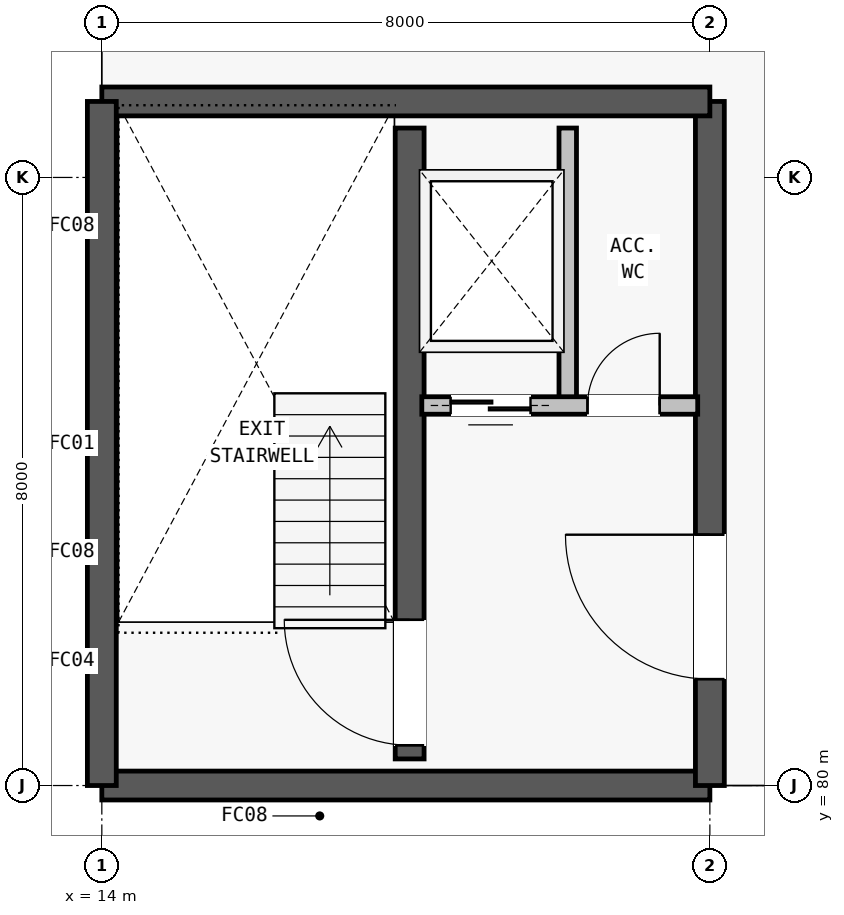
"""IFC4 building model, lengths in metres.
Left out: names, types, materials, properties, quantities, classifications, styles, units other than length and angle.
Written with IfcOpenShell. Run it as: python <this file> out.ifc"""

import sys

from ifc_helpers import new_model, si_unit, direction, frame, frame_2d, origin, place, context, subcontext, project, spatial, rectangle, extrude, element, fill, save


model = new_model("IFC4")
c1 = context("Model", 3, precision=1e-05, world=origin(), true_north=direction((0.0, 1.0)))
c2 = subcontext(c1, "Body", "Model", "MODEL_VIEW")
j1 = project(units=[si_unit("LENGTHUNIT", "METRE"), si_unit("PLANEANGLEUNIT", "RADIAN")], contexts=[c1])
p1 = place(None, origin())
s1 = spatial("IfcSite", under=j1, at=p1, CompositionType="ELEMENT")
p2 = place(p1, origin())
s2 = spatial("IfcBuilding", under=s1, at=p2, CompositionType="ELEMENT")
p3 = place(p2, frame((0.0, 0.0, 13.4)))
s3 = spatial("IfcBuildingStorey", under=s2, at=p3, CompositionType="ELEMENT", Elevation=13.4)
p4 = place(p3, frame((14.0, 80.0, 0.0), z_axis=(0.0, 0.0, 1.0), x_axis=(1.0, 0.0, 0.0)))
e1 = element("IfcWall", 1, at=p4, inside=s3, PredefinedType="SHEAR", context=c2, shape_type="SweptSolid", body=[
    extrude(rectangle(XDim=8.0, YDim=0.38, at=frame_2d((4.0, 0.0))), origin(), (0.0, 0.0, 1.0), 3.645),
])
p5 = place(p3, frame((22.0, 80.0, 0.0), z_axis=(0.0, 0.0, 1.0), x_axis=(0.0, 1.0, 0.0)))
e2 = element("IfcWall", 2, at=p5, inside=s3, PredefinedType="SHEAR", context=c2, shape_type="SweptSolid", body=[
    extrude(rectangle(XDim=9.0, YDim=0.38, at=frame_2d((4.5, 0.0))), origin(), (0.0, 0.0, 1.0), 3.645),
])
p6 = place(p5, frame((1.4, 0.0, 0.0)))
e3 = element("IfcOpeningElement", 3, at=p6, cuts=e2, PredefinedType="OPENING", context=c2, shape_type="SweptSolid", body=[
    extrude(rectangle(XDim=1.9, YDim=2.3, at=frame_2d((0.95, 1.15))), frame((0.0, 0.2, 0.0), z_axis=(0.0, -1.0, 0.0), x_axis=(1.0, 0.0, 0.0)), (0.0, 0.0, 1.0), 0.4),
])
p7 = place(p3, frame((22.0, 89.0, 0.0), z_axis=(0.0, 0.0, 1.0), x_axis=(-1.0, 0.0, 0.0)))
e4 = element("IfcWall", 4, at=p7, inside=s3, PredefinedType="SHEAR", context=c2, shape_type="SweptSolid", body=[
    extrude(rectangle(XDim=8.0, YDim=0.38, at=frame_2d((4.0, 0.0))), origin(), (0.0, 0.0, 1.0), 3.645),
])
p8 = place(p3, frame((14.0, 89.0, 0.0), z_axis=(0.0, 0.0, 1.0), x_axis=(0.0, -1.0, 0.0)))
e5 = element("IfcWall", 5, at=p8, inside=s3, PredefinedType="SHEAR", context=c2, shape_type="SweptSolid", body=[
    extrude(rectangle(XDim=9.0, YDim=0.38, at=frame_2d((4.5, 0.0))), origin(), (0.0, 0.0, 1.0), 3.645),
])
p9 = place(p3, frame((18.05, 80.35, 0.0), z_axis=(0.0, 0.0, 1.0), x_axis=(0.0, 1.0, 0.0)))
e6 = element("IfcWall", 6, at=p9, inside=s3, PredefinedType="SHEAR", context=c2, shape_type="SweptSolid", body=[
    extrude(rectangle(XDim=8.3, YDim=0.38, at=frame_2d((4.15, 0.0))), origin(), (0.0, 0.0, 1.0), 3.645),
])
p10 = place(p9, frame((0.18, 0.0, 0.0)))
e7 = element("IfcOpeningElement", 7, at=p10, cuts=e6, PredefinedType="OPENING", context=c2, shape_type="SweptSolid", body=[
    extrude(rectangle(XDim=1.65, YDim=2.2, at=frame_2d((0.825, 1.1))), frame((0.0, 0.2, 0.0), z_axis=(0.0, -1.0, 0.0), x_axis=(1.0, 0.0, 0.0)), (0.0, 0.0, 1.0), 0.4),
])
p11 = place(p3, frame((20.13, 85.0, 0.0), z_axis=(0.0, 0.0, 1.0), x_axis=(0.0, 1.0, 0.0)))
e8 = element("IfcWall", 8, at=p11, inside=s3, PredefinedType="PARTITIONING", context=c2, shape_type="SweptSolid", body=[
    extrude(rectangle(XDim=3.65, YDim=0.23, at=frame_2d((1.825, 0.0))), origin(), (0.0, 0.0, 1.0), 2.48),
])
p12 = place(p3, frame((18.21, 85.0, 0.0), z_axis=(0.0, 0.0, 1.0), x_axis=(1.0, 0.0, 0.0)))
e9 = element("IfcWall", 9, at=p12, inside=s3, PredefinedType="PARTITIONING", context=c2, shape_type="SweptSolid", body=[
    extrude(rectangle(XDim=3.63, YDim=0.23, at=frame_2d((1.815, 0.0))), origin(), (0.0, 0.0, 1.0), 2.48),
])
p13 = place(p12, frame((0.38, 0.0, 0.0)))
e10 = element("IfcOpeningElement", 10, at=p13, cuts=e9, PredefinedType="OPENING", context=c2, shape_type="SweptSolid", body=[
    extrude(rectangle(XDim=1.05, YDim=2.15, at=frame_2d((0.525, 1.075))), frame((0.0, 0.125, 0.0), z_axis=(0.0, -1.0, 0.0), x_axis=(1.0, 0.0, 0.0)), (0.0, 0.0, 1.0), 0.25),
])
p14 = place(p12, frame((2.18, 0.0, 0.0)))
e11 = element("IfcOpeningElement", 11, at=p14, cuts=e9, PredefinedType="OPENING", context=c2, shape_type="SweptSolid", body=[
    extrude(rectangle(XDim=0.95, YDim=2.1, at=frame_2d((0.475, 1.05))), frame((0.0, 0.125, 0.0), z_axis=(0.0, -1.0, 0.0), x_axis=(1.0, 0.0, 0.0)), (0.0, 0.0, 1.0), 0.25),
])
p15 = place(p6, origin())
e12 = element("IfcDoor", 12, at=p15, inside=s3, OperationType="SINGLE_SWING_RIGHT", PredefinedType="DOOR", context=c2, shape_type="SweptSolid", body=[
    extrude(rectangle(XDim=1.9, YDim=2.3, at=frame_2d((0.95, 1.15))), frame((0.0, 0.025, 0.0), z_axis=(0.0, -1.0, 0.0), x_axis=(1.0, 0.0, 0.0)), (0.0, 0.0, 1.0), 0.05),
])
fill(e3, e12)
p16 = place(p10, origin())
e13 = element("IfcDoor", 13, at=p16, inside=s3, OperationType="SINGLE_SWING_RIGHT", PredefinedType="DOOR", context=c2, shape_type="SweptSolid", body=[
    extrude(rectangle(XDim=1.65, YDim=2.2, at=frame_2d((0.825, 1.1))), frame((0.0, 0.025, 0.0), z_axis=(0.0, -1.0, 0.0), x_axis=(1.0, 0.0, 0.0)), (0.0, 0.0, 1.0), 0.05),
])
fill(e7, e13)
p17 = place(p13, origin())
e14 = element("IfcDoor", 14, at=p17, inside=s3, OperationType="SLIDING_TO_LEFT", PredefinedType="DOOR", context=c2, shape_type="SweptSolid", body=[
    extrude(rectangle(XDim=1.05, YDim=2.15, at=frame_2d((0.525, 1.075))), frame((0.0, 0.025, 0.0), z_axis=(0.0, -1.0, 0.0), x_axis=(1.0, 0.0, 0.0)), (0.0, 0.0, 1.0), 0.05),
])
fill(e10, e14)
p18 = place(p14, origin())
e15 = element("IfcDoor", 15, at=p18, inside=s3, OperationType="SINGLE_SWING_RIGHT", PredefinedType="DOOR", context=c2, shape_type="SweptSolid", body=[
    extrude(rectangle(XDim=0.95, YDim=2.1, at=frame_2d((0.475, 1.05))), frame((0.0, 0.025, 0.0), z_axis=(0.0, -1.0, 0.0), x_axis=(1.0, 0.0, 0.0)), (0.0, 0.0, 1.0), 0.05),
])
fill(e11, e15)
save(model, sys.argv[1])
